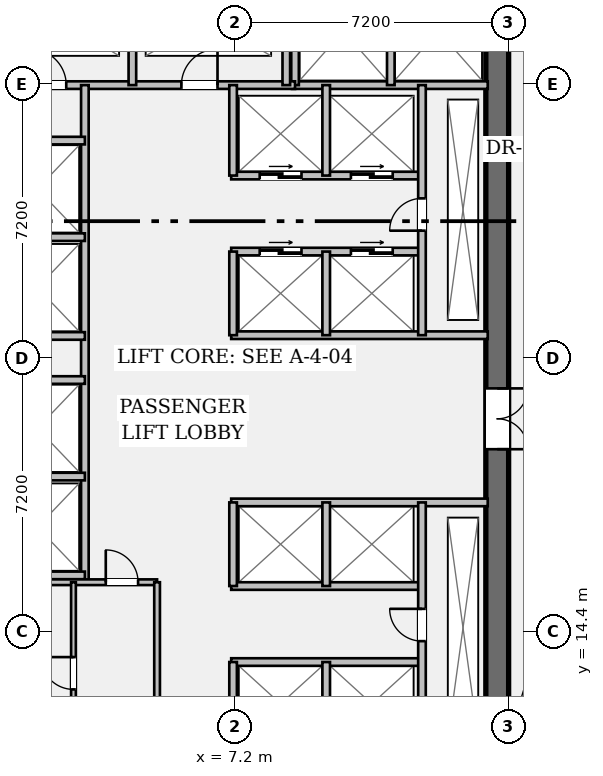
"""IFC4 building model, lengths in metres.
Left out: names, types, materials, properties, quantities, classifications, styles, units other than length and angle.
Written with IfcOpenShell. Run it as: python <this file> out.ifc"""

import sys

from ifc_helpers import new_model, si_unit, direction, frame, frame_2d, origin, place, context, subcontext, project, spatial, rectangle, extrude, element, fill, save


model = new_model("IFC4")
c1 = context("Model", 3, precision=1e-05, world=origin(), true_north=direction((0.0, 1.0)))
c2 = subcontext(c1, "Body", "Model", "MODEL_VIEW")
j1 = project(units=[si_unit("LENGTHUNIT", "METRE"), si_unit("PLANEANGLEUNIT", "RADIAN")], contexts=[c1])
p1 = place(None, origin())
s1 = spatial("IfcSite", under=j1, at=p1, CompositionType="ELEMENT")
p2 = place(p1, origin())
s2 = spatial("IfcBuilding", under=s1, at=p2, CompositionType="ELEMENT")
p3 = place(p2, frame((0.0, 0.0, 42.7)))
s3 = spatial("IfcBuildingStorey", under=s2, at=p3, CompositionType="ELEMENT", Elevation=42.7)
p4 = place(p3, frame((14.1, 35.4, 0.0), z_axis=(0.0, 0.0, 1.0), x_axis=(0.0, -1.0, 0.0)))
e1 = element("IfcWall", 1, at=p4, inside=s3, PredefinedType="SHEAR", context=c2, shape_type="SweptSolid", body=[
    extrude(rectangle(XDim=27.6, YDim=0.6, at=frame_2d((13.8, 0.0))), origin(), (0.0, 0.0, 1.0), 3.57),
])
p5 = place(p4, frame((1.3, 0.0, 0.0)))
e2 = element("IfcOpeningElement", 2, at=p5, cuts=e1, PredefinedType="OPENING", context=c2, shape_type="SweptSolid", body=[
    extrude(rectangle(XDim=1.2, YDim=2.15, at=frame_2d((0.6, 1.075))), frame((0.0, 0.312, 0.0), z_axis=(0.0, -1.0, 0.0), x_axis=(1.0, 0.0, 0.0)), (0.0, 0.0, 1.0), 0.624),
])
p6 = place(p4, frame((25.25, 0.0, 0.0)))
e3 = element("IfcOpeningElement", 3, at=p6, cuts=e1, PredefinedType="OPENING", context=c2, shape_type="SweptSolid", body=[
    extrude(rectangle(XDim=1.2, YDim=2.15, at=frame_2d((0.6, 1.075))), frame((0.0, 0.312, 0.0), z_axis=(0.0, -1.0, 0.0), x_axis=(1.0, 0.0, 0.0)), (0.0, 0.0, 1.0), 0.624),
])
p7 = place(p4, frame((14.6, 0.0, 0.0)))
e4 = element("IfcOpeningElement", 4, at=p7, cuts=e1, PredefinedType="OPENING", context=c2, shape_type="SweptSolid", body=[
    extrude(rectangle(XDim=1.6, YDim=2.2, at=frame_2d((0.8, 1.1))), frame((0.0, 0.312, 0.0), z_axis=(0.0, -1.0, 0.0), x_axis=(1.0, 0.0, 0.0)), (0.0, 0.0, 1.0), 0.624),
])
p8 = place(p3, frame((8.7, 28.78, 0.0), z_axis=(0.0, 0.0, 1.0), x_axis=(1.0, 0.0, 0.0)))
e5 = element("IfcWall", 5, at=p8, inside=s3, PredefinedType="PARTITIONING", context=c2, shape_type="SweptSolid", body=[
    extrude(rectangle(XDim=5.15, YDim=0.2, at=frame_2d((2.575, 0.0))), origin(), (0.0, 0.0, 1.0), 3.57),
])
for number, where, z_axis, x_axis in (
    (6, (8.78, 28.78, 0.0), (0.0, 0.0, 1.0), (0.0, 1.0, 0.0)),
    (7, (11.3, 28.78, 0.0), (0.0, 0.0, 1.0), (0.0, 1.0, 0.0)),
):
    element("IfcWall", number, at=place(p3, frame(where, z_axis=z_axis, x_axis=x_axis)), inside=s3, PredefinedType="PARTITIONING", context=c2, shape_type="SweptSolid", body=[
        extrude(rectangle(XDim=3.1, YDim=0.2, at=frame_2d((1.55, 0.0))), origin(), (0.0, 0.0, 1.0), 3.57),
    ])
p9 = place(p3, frame((0.6, 28.78, 0.0), z_axis=(0.0, 0.0, 1.0), x_axis=(1.0, 0.0, 0.0)))
e8 = element("IfcWall", 8, at=p9, inside=s3, PredefinedType="PARTITIONING", context=c2, shape_type="SweptSolid", body=[
    extrude(rectangle(XDim=8.18, YDim=0.2, at=frame_2d((4.09, 0.0))), origin(), (0.0, 0.0, 1.0), 3.57),
])
p10 = place(p9, frame((1.21, 0.0, 0.0)))
e9 = element("IfcOpeningElement", 9, at=p10, cuts=e8, PredefinedType="OPENING", context=c2, shape_type="SweptSolid", body=[
    extrude(rectangle(XDim=0.95, YDim=2.15, at=frame_2d((0.475, 1.075))), frame((0.0, 0.112, 0.0), z_axis=(0.0, -1.0, 0.0), x_axis=(1.0, 0.0, 0.0)), (0.0, 0.0, 1.0), 0.224),
])
p11 = place(p9, frame((5.19, 0.0, 0.0)))
e10 = element("IfcOpeningElement", 10, at=p11, cuts=e8, PredefinedType="OPENING", context=c2, shape_type="SweptSolid", body=[
    extrude(rectangle(XDim=0.95, YDim=2.15, at=frame_2d((0.475, 1.075))), frame((0.0, 0.112, 0.0), z_axis=(0.0, -1.0, 0.0), x_axis=(1.0, 0.0, 0.0)), (0.0, 0.0, 1.0), 0.224),
])
for number, where, z_axis, x_axis in (
    (11, (4.5, 28.78, 0.0), (0.0, 0.0, 1.0), (0.0, 1.0, 0.0)),
    (12, (8.55, 28.78, 0.0), (0.0, 0.0, 1.0), (0.0, 1.0, 0.0)),
):
    element("IfcWall", number, at=place(p3, frame(where, z_axis=z_axis, x_axis=x_axis)), inside=s3, PredefinedType="PARTITIONING", context=c2, shape_type="SweptSolid", body=[
        extrude(rectangle(XDim=2.94, YDim=0.2, at=frame_2d((1.47, 0.0))), origin(), (0.0, 0.0, 1.0), 3.57),
    ])
p12 = place(p3, frame((3.25, 15.7, 0.0), z_axis=(0.0, 0.0, 1.0), x_axis=(0.0, 1.0, 0.0)))
e13 = element("IfcWall", 13, at=p12, inside=s3, PredefinedType="PARTITIONING", context=c2, shape_type="SweptSolid", body=[
    extrude(rectangle(XDim=13.08, YDim=0.2, at=frame_2d((6.54, 0.0))), origin(), (0.0, 0.0, 1.0), 3.57),
])
for number, where, z_axis, x_axis in (
    (14, (0.6, 15.88, 0.0), (0.0, 0.0, 1.0), (1.0, 0.0, 0.0)),
    (15, (0.6, 18.48, 0.0), (0.0, 0.0, 1.0), (1.0, 0.0, 0.0)),
    (16, (0.6, 22.18, 0.0), (0.0, 0.0, 1.0), (1.0, 0.0, 0.0)),
    (17, (0.6, 24.78, 0.0), (0.0, 0.0, 1.0), (1.0, 0.0, 0.0)),
    (18, (0.6, 21.02, 0.0), (0.0, 0.0, 1.0), (1.0, 0.0, 0.0)),
    (19, (0.6, 27.32, 0.0), (0.0, 0.0, 1.0), (1.0, 0.0, 0.0)),
):
    element("IfcWall", number, at=place(p3, frame(where, z_axis=z_axis, x_axis=x_axis)), inside=s3, PredefinedType="PARTITIONING", context=c2, shape_type="SweptSolid", body=[
        extrude(rectangle(XDim=2.65, YDim=0.2, at=frame_2d((1.325, 0.0))), origin(), (0.0, 0.0, 1.0), 3.57),
    ])
p13 = place(p3, frame((7.1, 22.2, 0.0), z_axis=(0.0, 0.0, 1.0), x_axis=(1.0, 0.0, 0.0)))
e20 = element("IfcWall", 20, at=p13, inside=s3, PredefinedType="PARTITIONING", context=c2, shape_type="SweptSolid", body=[
    extrude(rectangle(XDim=6.75, YDim=0.2, at=frame_2d((3.375, 0.0))), origin(), (0.0, 0.0, 1.0), 3.57),
])
p14 = place(p3, frame((7.1, 24.4, 0.0), z_axis=(0.0, 0.0, 1.0), x_axis=(1.0, 0.0, 0.0)))
e21 = element("IfcWall", 21, at=p14, inside=s3, PredefinedType="PARTITIONING", context=c2, shape_type="SweptSolid", body=[
    extrude(rectangle(XDim=5.02, YDim=0.2, at=frame_2d((2.51, 0.0))), origin(), (0.0, 0.0, 1.0), 3.57),
])
p15 = place(p14, frame((0.75, 0.0, 0.0)))
e22 = element("IfcOpeningElement", 22, at=p15, cuts=e21, PredefinedType="OPENING", context=c2, shape_type="SweptSolid", body=[
    extrude(rectangle(XDim=1.1, YDim=2.2, at=frame_2d((0.55, 1.1))), frame((0.0, 0.112, 0.0), z_axis=(0.0, -1.0, 0.0), x_axis=(1.0, 0.0, 0.0)), (0.0, 0.0, 1.0), 0.224),
])
p16 = place(p14, frame((3.15, 0.0, 0.0)))
e23 = element("IfcOpeningElement", 23, at=p16, cuts=e21, PredefinedType="OPENING", context=c2, shape_type="SweptSolid", body=[
    extrude(rectangle(XDim=1.1, YDim=2.2, at=frame_2d((0.55, 1.1))), frame((0.0, 0.112, 0.0), z_axis=(0.0, -1.0, 0.0), x_axis=(1.0, 0.0, 0.0)), (0.0, 0.0, 1.0), 0.224),
])
p17 = place(p3, frame((7.1, 26.4, 0.0), z_axis=(0.0, 0.0, 1.0), x_axis=(1.0, 0.0, 0.0)))
e24 = element("IfcWall", 24, at=p17, inside=s3, PredefinedType="PARTITIONING", context=c2, shape_type="SweptSolid", body=[
    extrude(rectangle(XDim=5.02, YDim=0.2, at=frame_2d((2.51, 0.0))), origin(), (0.0, 0.0, 1.0), 3.57),
])
p18 = place(p17, frame((0.75, 0.0, 0.0)))
e25 = element("IfcOpeningElement", 25, at=p18, cuts=e24, PredefinedType="OPENING", context=c2, shape_type="SweptSolid", body=[
    extrude(rectangle(XDim=1.1, YDim=2.2, at=frame_2d((0.55, 1.1))), frame((0.0, 0.112, 0.0), z_axis=(0.0, -1.0, 0.0), x_axis=(1.0, 0.0, 0.0)), (0.0, 0.0, 1.0), 0.224),
])
p19 = place(p17, frame((3.15, 0.0, 0.0)))
e26 = element("IfcOpeningElement", 26, at=p19, cuts=e24, PredefinedType="OPENING", context=c2, shape_type="SweptSolid", body=[
    extrude(rectangle(XDim=1.1, YDim=2.2, at=frame_2d((0.55, 1.1))), frame((0.0, 0.112, 0.0), z_axis=(0.0, -1.0, 0.0), x_axis=(1.0, 0.0, 0.0)), (0.0, 0.0, 1.0), 0.224),
])
p20 = place(p3, frame((7.15, 22.2, 0.0), z_axis=(0.0, 0.0, 1.0), x_axis=(0.0, 1.0, 0.0)))
e27 = element("IfcWall", 27, at=p20, inside=s3, PredefinedType="PARTITIONING", context=c2, shape_type="SweptSolid", body=[
    extrude(rectangle(XDim=2.2, YDim=0.2, at=frame_2d((1.1, 0.0))), origin(), (0.0, 0.0, 1.0), 3.57),
])
p21 = place(p3, frame((7.15, 26.4, 0.0), z_axis=(0.0, 0.0, 1.0), x_axis=(0.0, 1.0, 0.0)))
e28 = element("IfcWall", 28, at=p21, inside=s3, PredefinedType="PARTITIONING", context=c2, shape_type="SweptSolid", body=[
    extrude(rectangle(XDim=2.38, YDim=0.2, at=frame_2d((1.19, 0.0))), origin(), (0.0, 0.0, 1.0), 3.57),
])
p22 = place(p3, frame((9.6, 22.2, 0.0), z_axis=(0.0, 0.0, 1.0), x_axis=(0.0, 1.0, 0.0)))
e29 = element("IfcWall", 29, at=p22, inside=s3, PredefinedType="PARTITIONING", context=c2, shape_type="SweptSolid", body=[
    extrude(rectangle(XDim=2.2, YDim=0.2, at=frame_2d((1.1, 0.0))), origin(), (0.0, 0.0, 1.0), 3.57),
])
p23 = place(p3, frame((9.6, 26.4, 0.0), z_axis=(0.0, 0.0, 1.0), x_axis=(0.0, 1.0, 0.0)))
e30 = element("IfcWall", 30, at=p23, inside=s3, PredefinedType="PARTITIONING", context=c2, shape_type="SweptSolid", body=[
    extrude(rectangle(XDim=2.38, YDim=0.2, at=frame_2d((1.19, 0.0))), origin(), (0.0, 0.0, 1.0), 3.57),
])
p24 = place(p3, frame((12.12, 22.2, 0.0), z_axis=(0.0, 0.0, 1.0), x_axis=(0.0, 1.0, 0.0)))
e31 = element("IfcWall", 31, at=p24, inside=s3, PredefinedType="PARTITIONING", context=c2, shape_type="SweptSolid", body=[
    extrude(rectangle(XDim=6.58, YDim=0.2, at=frame_2d((3.29, 0.0))), origin(), (0.0, 0.0, 1.0), 3.57),
])
p25 = place(p24, frame((2.75, 0.0, 0.0)))
e32 = element("IfcOpeningElement", 32, at=p25, cuts=e31, PredefinedType="OPENING", context=c2, shape_type="SweptSolid", body=[
    extrude(rectangle(XDim=0.85, YDim=2.15, at=frame_2d((0.425, 1.075))), frame((0.0, 0.112, 0.0), z_axis=(0.0, -1.0, 0.0), x_axis=(1.0, 0.0, 0.0)), (0.0, 0.0, 1.0), 0.224),
])
p26 = place(p3, frame((7.1, 17.8, 0.0), z_axis=(0.0, 0.0, 1.0), x_axis=(1.0, 0.0, 0.0)))
e33 = element("IfcWall", 33, at=p26, inside=s3, PredefinedType="PARTITIONING", context=c2, shape_type="SweptSolid", body=[
    extrude(rectangle(XDim=6.75, YDim=0.2, at=frame_2d((3.375, 0.0))), origin(), (0.0, 0.0, 1.0), 3.57),
])
for number, where, z_axis, x_axis in (
    (34, (7.1, 15.6, 0.0), (0.0, 0.0, 1.0), (1.0, 0.0, 0.0)),
    (35, (7.1, 13.6, 0.0), (0.0, 0.0, 1.0), (1.0, 0.0, 0.0)),
):
    element("IfcWall", number, at=place(p3, frame(where, z_axis=z_axis, x_axis=x_axis)), inside=s3, PredefinedType="PARTITIONING", context=c2, shape_type="SweptSolid", body=[
        extrude(rectangle(XDim=5.02, YDim=0.2, at=frame_2d((2.51, 0.0))), origin(), (0.0, 0.0, 1.0), 3.57),
    ])
p27 = place(p3, frame((7.15, 15.6, 0.0), z_axis=(0.0, 0.0, 1.0), x_axis=(0.0, 1.0, 0.0)))
e36 = element("IfcWall", 36, at=p27, inside=s3, PredefinedType="PARTITIONING", context=c2, shape_type="SweptSolid", body=[
    extrude(rectangle(XDim=2.2, YDim=0.2, at=frame_2d((1.1, 0.0))), origin(), (0.0, 0.0, 1.0), 3.57),
])
p28 = place(p3, frame((7.15, 11.2, 0.0), z_axis=(0.0, 0.0, 1.0), x_axis=(0.0, 1.0, 0.0)))
e37 = element("IfcWall", 37, at=p28, inside=s3, PredefinedType="PARTITIONING", context=c2, shape_type="SweptSolid", body=[
    extrude(rectangle(XDim=2.4, YDim=0.2, at=frame_2d((1.2, 0.0))), origin(), (0.0, 0.0, 1.0), 3.57),
])
p29 = place(p3, frame((9.6, 15.6, 0.0), z_axis=(0.0, 0.0, 1.0), x_axis=(0.0, 1.0, 0.0)))
e38 = element("IfcWall", 38, at=p29, inside=s3, PredefinedType="PARTITIONING", context=c2, shape_type="SweptSolid", body=[
    extrude(rectangle(XDim=2.2, YDim=0.2, at=frame_2d((1.1, 0.0))), origin(), (0.0, 0.0, 1.0), 3.57),
])
p30 = place(p3, frame((9.6, 11.2, 0.0), z_axis=(0.0, 0.0, 1.0), x_axis=(0.0, 1.0, 0.0)))
e39 = element("IfcWall", 39, at=p30, inside=s3, PredefinedType="PARTITIONING", context=c2, shape_type="SweptSolid", body=[
    extrude(rectangle(XDim=2.4, YDim=0.2, at=frame_2d((1.2, 0.0))), origin(), (0.0, 0.0, 1.0), 3.57),
])
p31 = place(p3, frame((12.12, 11.2, 0.0), z_axis=(0.0, 0.0, 1.0), x_axis=(0.0, 1.0, 0.0)))
e40 = element("IfcWall", 40, at=p31, inside=s3, PredefinedType="PARTITIONING", context=c2, shape_type="SweptSolid", body=[
    extrude(rectangle(XDim=6.6, YDim=0.2, at=frame_2d((3.3, 0.0))), origin(), (0.0, 0.0, 1.0), 3.57),
])
p32 = place(p31, frame((2.95, 0.0, 0.0)))
e41 = element("IfcOpeningElement", 41, at=p32, cuts=e40, PredefinedType="OPENING", context=c2, shape_type="SweptSolid", body=[
    extrude(rectangle(XDim=0.85, YDim=2.15, at=frame_2d((0.425, 1.075))), frame((0.0, 0.112, 0.0), z_axis=(0.0, -1.0, 0.0), x_axis=(1.0, 0.0, 0.0)), (0.0, 0.0, 1.0), 0.224),
])
p33 = place(p3, frame((0.6, 15.7, 0.0), z_axis=(0.0, 0.0, 1.0), x_axis=(1.0, 0.0, 0.0)))
e42 = element("IfcWall", 42, at=p33, inside=s3, PredefinedType="PARTITIONING", context=c2, shape_type="SweptSolid", body=[
    extrude(rectangle(XDim=4.55, YDim=0.15, at=frame_2d((2.275, 0.0))), origin(), (0.0, 0.0, 1.0), 3.57),
])
p34 = place(p33, frame((3.2, 0.0, 0.0)))
e43 = element("IfcOpeningElement", 43, at=p34, cuts=e42, PredefinedType="OPENING", context=c2, shape_type="SweptSolid", body=[
    extrude(rectangle(XDim=0.85, YDim=2.15, at=frame_2d((0.425, 1.075))), frame((0.0, 0.087, 0.0), z_axis=(0.0, -1.0, 0.0), x_axis=(1.0, 0.0, 0.0)), (0.0, 0.0, 1.0), 0.174),
])
p35 = place(p3, frame((5.15, 11.28, 0.0), z_axis=(0.0, 0.0, 1.0), x_axis=(0.0, 1.0, 0.0)))
e44 = element("IfcWall", 44, at=p35, inside=s3, PredefinedType="PARTITIONING", context=c2, shape_type="SweptSolid", body=[
    extrude(rectangle(XDim=4.42, YDim=0.15, at=frame_2d((2.21, 0.0))), origin(), (0.0, 0.0, 1.0), 3.57),
])
p36 = place(p3, frame((2.95, 11.28, 0.0), z_axis=(0.0, 0.0, 1.0), x_axis=(0.0, 1.0, 0.0)))
e45 = element("IfcWall", 45, at=p36, inside=s3, PredefinedType="PARTITIONING", context=c2, shape_type="SweptSolid", body=[
    extrude(rectangle(XDim=4.42, YDim=0.125, at=frame_2d((2.21, 0.0))), origin(), (0.0, 0.0, 1.0), 3.57),
])
p37 = place(p36, frame((1.6, 0.0, 0.0)))
e46 = element("IfcOpeningElement", 46, at=p37, cuts=e45, PredefinedType="OPENING", context=c2, shape_type="SweptSolid", body=[
    extrude(rectangle(XDim=0.85, YDim=2.15, at=frame_2d((0.425, 1.075))), frame((0.0, 0.074, 0.0), z_axis=(0.0, -1.0, 0.0), x_axis=(1.0, 0.0, 0.0)), (0.0, 0.0, 1.0), 0.149),
])
p38 = place(p10, origin())
e47 = element("IfcDoor", 47, at=p38, inside=s3, OperationType="SINGLE_SWING_LEFT", PredefinedType="DOOR", context=c2, shape_type="SweptSolid", body=[
    extrude(rectangle(XDim=0.95, YDim=2.15, at=frame_2d((0.475, 1.075))), frame((0.0, 0.025, 0.0), z_axis=(0.0, -1.0, 0.0), x_axis=(1.0, 0.0, 0.0)), (0.0, 0.0, 1.0), 0.05),
])
fill(e9, e47)
p39 = place(p11, origin())
e48 = element("IfcDoor", 48, at=p39, inside=s3, OperationType="SINGLE_SWING_RIGHT", PredefinedType="DOOR", context=c2, shape_type="SweptSolid", body=[
    extrude(rectangle(XDim=0.95, YDim=2.15, at=frame_2d((0.475, 1.075))), frame((0.0, 0.025, 0.0), z_axis=(0.0, -1.0, 0.0), x_axis=(1.0, 0.0, 0.0)), (0.0, 0.0, 1.0), 0.05),
])
fill(e10, e48)
p40 = place(p7, origin())
e49 = element("IfcDoor", 49, at=p40, inside=s3, OperationType="DOUBLE_DOOR_SINGLE_SWING", PredefinedType="DOOR", context=c2, shape_type="SweptSolid", body=[
    extrude(rectangle(XDim=1.6, YDim=2.2, at=frame_2d((0.8, 1.1))), frame((0.0, 0.025, 0.0), z_axis=(0.0, -1.0, 0.0), x_axis=(1.0, 0.0, 0.0)), (0.0, 0.0, 1.0), 0.05),
])
fill(e4, e49)
p41 = place(p25, origin())
e50 = element("IfcDoor", 50, at=p41, inside=s3, OperationType="SINGLE_SWING_LEFT", PredefinedType="DOOR", context=c2, shape_type="SweptSolid", body=[
    extrude(rectangle(XDim=0.85, YDim=2.15, at=frame_2d((0.425, 1.075))), frame((0.0, 0.025, 0.0), z_axis=(0.0, -1.0, 0.0), x_axis=(1.0, 0.0, 0.0)), (0.0, 0.0, 1.0), 0.05),
])
fill(e32, e50)
p42 = place(p15, origin())
e51 = element("IfcDoor", 51, at=p42, inside=s3, OperationType="DOUBLE_DOOR_SLIDING", PredefinedType="DOOR", context=c2, shape_type="SweptSolid", body=[
    extrude(rectangle(XDim=1.1, YDim=2.2, at=frame_2d((0.55, 1.1))), frame((0.0, 0.025, 0.0), z_axis=(0.0, -1.0, 0.0), x_axis=(1.0, 0.0, 0.0)), (0.0, 0.0, 1.0), 0.05),
])
fill(e22, e51)
p43 = place(p16, origin())
e52 = element("IfcDoor", 52, at=p43, inside=s3, OperationType="DOUBLE_DOOR_SLIDING", PredefinedType="DOOR", context=c2, shape_type="SweptSolid", body=[
    extrude(rectangle(XDim=1.1, YDim=2.2, at=frame_2d((0.55, 1.1))), frame((0.0, 0.025, 0.0), z_axis=(0.0, -1.0, 0.0), x_axis=(1.0, 0.0, 0.0)), (0.0, 0.0, 1.0), 0.05),
])
fill(e23, e52)
p44 = place(p18, origin())
e53 = element("IfcDoor", 53, at=p44, inside=s3, OperationType="DOUBLE_DOOR_SLIDING", PredefinedType="DOOR", context=c2, shape_type="SweptSolid", body=[
    extrude(rectangle(XDim=1.1, YDim=2.2, at=frame_2d((0.55, 1.1))), frame((0.0, 0.025, 0.0), z_axis=(0.0, -1.0, 0.0), x_axis=(1.0, 0.0, 0.0)), (0.0, 0.0, 1.0), 0.05),
])
fill(e25, e53)
p45 = place(p19, origin())
e54 = element("IfcDoor", 54, at=p45, inside=s3, OperationType="DOUBLE_DOOR_SLIDING", PredefinedType="DOOR", context=c2, shape_type="SweptSolid", body=[
    extrude(rectangle(XDim=1.1, YDim=2.2, at=frame_2d((0.55, 1.1))), frame((0.0, 0.025, 0.0), z_axis=(0.0, -1.0, 0.0), x_axis=(1.0, 0.0, 0.0)), (0.0, 0.0, 1.0), 0.05),
])
fill(e26, e54)
p46 = place(p32, origin())
e55 = element("IfcDoor", 55, at=p46, inside=s3, OperationType="SINGLE_SWING_RIGHT", PredefinedType="DOOR", context=c2, shape_type="SweptSolid", body=[
    extrude(rectangle(XDim=0.85, YDim=2.15, at=frame_2d((0.425, 1.075))), frame((0.0, 0.025, 0.0), z_axis=(0.0, -1.0, 0.0), x_axis=(1.0, 0.0, 0.0)), (0.0, 0.0, 1.0), 0.05),
])
fill(e41, e55)
p47 = place(p34, origin())
e56 = element("IfcDoor", 56, at=p47, inside=s3, OperationType="SINGLE_SWING_LEFT", PredefinedType="DOOR", context=c2, shape_type="SweptSolid", body=[
    extrude(rectangle(XDim=0.85, YDim=2.15, at=frame_2d((0.425, 1.075))), frame((0.0, 0.025, 0.0), z_axis=(0.0, -1.0, 0.0), x_axis=(1.0, 0.0, 0.0)), (0.0, 0.0, 1.0), 0.05),
])
fill(e43, e56)
p48 = place(p37, origin())
e57 = element("IfcDoor", 57, at=p48, inside=s3, OperationType="SINGLE_SWING_RIGHT", PredefinedType="DOOR", context=c2, shape_type="SweptSolid", body=[
    extrude(rectangle(XDim=0.85, YDim=2.15, at=frame_2d((0.425, 1.075))), frame((0.0, 0.025, 0.0), z_axis=(0.0, -1.0, 0.0), x_axis=(1.0, 0.0, 0.0)), (0.0, 0.0, 1.0), 0.05),
])
fill(e46, e57)
save(model, sys.argv[1])
